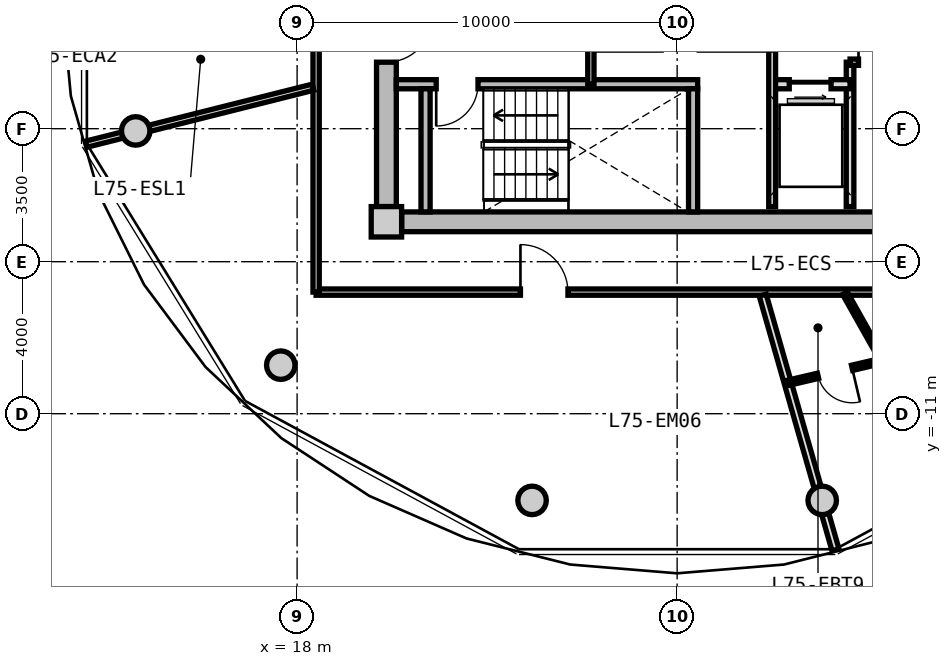
"""IFC4 building model, lengths in metres.
Left out: names, types, materials, properties, quantities, classifications, styles, units other than length and angle.
Written with IfcOpenShell. Run it as: python <this file> out.ifc"""

import sys

from ifc_helpers import new_model, si_unit, direction, frame, frame_2d, origin, origin_2d, place, context, subcontext, project, spatial, rectangle, circle, extrude, source, transform, mapped, element, fill, save


model = new_model("IFC4")
c1 = context("Model", 3, precision=1e-05, world=origin(), true_north=direction((0.0, 1.0)))
c2 = subcontext(c1, "Body", "Model", "MODEL_VIEW")
j1 = project(units=[si_unit("LENGTHUNIT", "METRE"), si_unit("PLANEANGLEUNIT", "RADIAN")], contexts=[c1])
p1 = place(None, origin())
s1 = spatial("IfcSite", under=j1, at=p1, CompositionType="ELEMENT")
p2 = place(p1, origin())
s2 = spatial("IfcBuilding", under=s1, at=p2, CompositionType="ELEMENT")
p3 = place(p2, frame((0.0, 0.0, 241.35)))
s3 = spatial("IfcBuildingStorey", under=s2, at=p3, CompositionType="ELEMENT", Elevation=241.35)
m1 = source(origin(), c2, "Body", "SweptSolid", [
    extrude(rectangle(XDim=0.8, YDim=0.8, at=origin_2d()), origin(), (0.0, 0.0, 1.0), 3.05),
])
p4 = place(p3, frame((20.35, -5.95, 0.0), z_axis=(0.0, 0.0, 1.0), x_axis=(1.0, 0.0, 0.0)))
e1 = element("IfcColumn", 1, at=p4, inside=s3, PredefinedType="COLUMN", context=c2, shape_type="MappedRepresentation", body=[
    mapped(m1, transform((0.0, 0.0, 0.0), x_axis=(1.0, 0.0, 0.0), y_axis=(0.0, 1.0, 0.0), z_axis=(0.0, 0.0, 1.0), scale=1.0)),
])
m2 = source(origin(), c2, "Body", "SweptSolid", [
    extrude(rectangle(XDim=14.5, YDim=0.52, at=frame_2d((7.25, 0.0))), origin(), (0.0, 0.0, 1.0), 2.73),
])
p5 = place(p3, frame((35.25, -5.95, 0.0), z_axis=(0.0, 0.0, 1.0), x_axis=(-1.0, 0.0, 0.0)))
e2 = element("IfcWall", 2, at=p5, inside=s3, PredefinedType="SHEAR", context=c2, shape_type="MappedRepresentation", body=[
    mapped(m2, transform((0.0, 0.0, 0.0), x_axis=(1.0, 0.0, 0.0), y_axis=(0.0, 1.0, 0.0), z_axis=(0.0, 0.0, 1.0), scale=1.0)),
])
m3 = source(origin(), c2, "Body", "SweptSolid", [
    extrude(rectangle(XDim=11.1, YDim=0.52, at=frame_2d((5.55, 0.0))), origin(), (0.0, 0.0, 1.0), 2.73),
])
p6 = place(p3, frame((20.35, -5.55, 0.0), z_axis=(0.0, 0.0, 1.0), x_axis=(0.0, 1.0, 0.0)))
e3 = element("IfcWall", 3, at=p6, inside=s3, PredefinedType="SHEAR", context=c2, shape_type="MappedRepresentation", body=[
    mapped(m3, transform((0.0, 0.0, 0.0), x_axis=(1.0, 0.0, 0.0), y_axis=(0.0, 1.0, 0.0), z_axis=(0.0, 0.0, 1.0), scale=1.0)),
])
p7 = place(p6, frame((3.8, 0.0, 0.0)))
e4 = element("IfcOpeningElement", 4, at=p7, cuts=e3, PredefinedType="OPENING", context=c2, shape_type="SweptSolid", body=[
    extrude(rectangle(XDim=1.2, YDim=2.15, at=frame_2d((0.6, 1.075))), frame((0.0, 0.27, 0.0), z_axis=(0.0, -1.0, 0.0), x_axis=(1.0, 0.0, 0.0)), (0.0, 0.0, 1.0), 0.54),
])
m4 = source(origin(), c2, "Body", "SweptSolid", [
    extrude(circle(Radius=0.375, at=origin_2d()), origin(), (0.0, 0.0, 1.0), 3.05),
])
for number, where, z_axis, x_axis in (
    (5, (13.753, -3.559, 0.0), (0.0, 0.0, 1.0), (1.0, 0.0, 0.0)),
    (6, (17.57, -9.723, 0.0), (0.0, 0.0, 1.0), (1.0, 0.0, 0.0)),
    (7, (24.182, -13.281, 0.0), (0.0, 0.0, 1.0), (1.0, 0.0, 0.0)),
    (8, (31.818, -13.281, 0.0), (0.0, 0.0, 1.0), (1.0, 0.0, 0.0)),
):
    element("IfcColumn", number, at=place(p3, frame(where, z_axis=z_axis, x_axis=x_axis)), inside=s3, PredefinedType="COLUMN", context=c2, shape_type="MappedRepresentation", body=[
        mapped(m4, transform((0.0, 0.0, 0.0), x_axis=(1.0, 0.0, 0.0), y_axis=(0.0, 1.0, 0.0), z_axis=(0.0, 0.0, 1.0), scale=1.0)),
    ])
m5 = source(origin(), c2, "Body", "SweptSolid", [
    extrude(rectangle(XDim=7.93, YDim=0.24, at=frame_2d((3.965, 0.0))), origin(), (0.0, 0.0, 1.0), 2.73),
])
p8 = place(p3, frame((20.61, -2.33, 0.0), z_axis=(0.0, 0.0, 1.0), x_axis=(1.0, 0.0, 0.0)))
e9 = element("IfcWall", 9, at=p8, inside=s3, PredefinedType="PARTITIONING", context=c2, shape_type="MappedRepresentation", body=[
    mapped(m5, transform((0.0, 0.0, 0.0), x_axis=(1.0, 0.0, 0.0), y_axis=(0.0, 1.0, 0.0), z_axis=(0.0, 0.0, 1.0), scale=1.0)),
])
p9 = place(p8, frame((1.05, 0.0, 0.0)))
e10 = element("IfcOpeningElement", 10, at=p9, cuts=e9, PredefinedType="OPENING", context=c2, shape_type="SweptSolid", body=[
    extrude(rectangle(XDim=1.1, YDim=2.15, at=frame_2d((0.55, 1.075))), frame((0.0, 0.13, 0.0), z_axis=(0.0, -1.0, 0.0), x_axis=(1.0, 0.0, 0.0)), (0.0, 0.0, 1.0), 0.26),
])
m6 = source(origin(), c2, "Body", "SweptSolid", [
    extrude(rectangle(XDim=3.24, YDim=0.24, at=frame_2d((1.62, 0.0))), origin(), (0.0, 0.0, 1.0), 2.73),
])
for number, where, z_axis, x_axis in (
    (11, (21.38, -5.69, 0.0), (0.0, 0.0, 1.0), (0.0, 1.0, 0.0)),
    (12, (28.42, -5.69, 0.0), (0.0, 0.0, 1.0), (0.0, 1.0, 0.0)),
):
    element("IfcWall", number, at=place(p3, frame(where, z_axis=z_axis, x_axis=x_axis)), inside=s3, PredefinedType="PARTITIONING", context=c2, shape_type="MappedRepresentation", body=[
        mapped(m6, transform((0.0, 0.0, 0.0), x_axis=(1.0, 0.0, 0.0), y_axis=(0.0, 1.0, 0.0), z_axis=(0.0, 0.0, 1.0), scale=1.0)),
    ])
m7 = source(origin(), c2, "Body", "SweptSolid", [
    extrude(rectangle(XDim=3.8, YDim=0.2, at=frame_2d((1.9, 0.0))), origin(), (0.0, 0.0, 1.0), 2.715),
])
p10 = place(p3, frame((32.55, -5.55, 0.0), z_axis=(0.0, 0.0, 1.0), x_axis=(0.0, 1.0, 0.0)))
e13 = element("IfcWall", 13, at=p10, inside=s3, PredefinedType="PARTITIONING", context=c2, shape_type="MappedRepresentation", body=[
    mapped(m7, transform((0.0, 0.0, 0.0), x_axis=(1.0, 0.0, 0.0), y_axis=(0.0, 1.0, 0.0), z_axis=(0.0, 0.0, 1.0), scale=1.0)),
])
m8 = source(origin(), c2, "Body", "SweptSolid", [
    extrude(rectangle(XDim=2.05, YDim=0.24, at=frame_2d((1.025, 0.0))), origin(), (0.0, 0.0, 1.0), 2.715),
])
p11 = place(p3, frame((30.5, -2.33, 0.0), z_axis=(0.0, 0.0, 1.0), x_axis=(1.0, 0.0, 0.0)))
e14 = element("IfcWall", 14, at=p11, inside=s3, PredefinedType="PARTITIONING", context=c2, shape_type="MappedRepresentation", body=[
    mapped(m8, transform((0.0, 0.0, 0.0), x_axis=(1.0, 0.0, 0.0), y_axis=(0.0, 1.0, 0.0), z_axis=(0.0, 0.0, 1.0), scale=1.0)),
])
p12 = place(p11, frame((0.45, 0.0, 0.0)))
e15 = element("IfcOpeningElement", 15, at=p12, cuts=e14, PredefinedType="OPENING", context=c2, shape_type="SweptSolid", body=[
    extrude(rectangle(XDim=1.1, YDim=2.2, at=frame_2d((0.55, 1.1))), frame((0.0, 0.13, 0.0), z_axis=(0.0, -1.0, 0.0), x_axis=(1.0, 0.0, 0.0)), (0.0, 0.0, 1.0), 0.26),
])
m9 = source(origin(), c2, "Body", "SweptSolid", [
    extrude(rectangle(XDim=4.2, YDim=0.18, at=frame_2d((2.1, 0.0))), origin(), (0.0, 0.0, 1.0), 2.715),
])
p13 = place(p3, frame((30.5, -5.55, 0.0), z_axis=(0.0, 0.0, 1.0), x_axis=(0.0, 1.0, 0.0)))
e16 = element("IfcWall", 16, at=p13, inside=s3, PredefinedType="PARTITIONING", context=c2, shape_type="MappedRepresentation", body=[
    mapped(m9, transform((0.0, 0.0, 0.0), x_axis=(1.0, 0.0, 0.0), y_axis=(0.0, 1.0, 0.0), z_axis=(0.0, 0.0, 1.0), scale=1.0)),
])
m10 = source(origin(), c2, "Body", "SweptSolid", [
    extrude(rectangle(XDim=0.98, YDim=0.165, at=frame_2d((0.49, 0.0))), origin(), (0.0, 0.0, 1.0), 2.715),
])
p14 = place(p3, frame((25.73, -2.33, 0.0), z_axis=(0.0, 0.0, 1.0), x_axis=(0.0, 1.0, 0.0)))
e17 = element("IfcWall", 17, at=p14, inside=s3, PredefinedType="PARTITIONING", context=c2, shape_type="MappedRepresentation", body=[
    mapped(m10, transform((0.0, 0.0, 0.0), x_axis=(1.0, 0.0, 0.0), y_axis=(0.0, 1.0, 0.0), z_axis=(0.0, 0.0, 1.0), scale=1.0)),
])
m11 = source(origin(), c2, "Body", "SweptSolid", [
    extrude(rectangle(XDim=2.7, YDim=0.165, at=frame_2d((1.35, 0.0))), origin(), (0.0, 0.0, 1.0), 2.715),
])
p15 = place(p3, frame((32.55, -1.75, 0.0), z_axis=(0.0, 0.0, 1.0), x_axis=(1.0, 0.0, 0.0)))
e18 = element("IfcWall", 18, at=p15, inside=s3, PredefinedType="PARTITIONING", context=c2, shape_type="MappedRepresentation", body=[
    mapped(m11, transform((0.0, 0.0, 0.0), x_axis=(1.0, 0.0, 0.0), y_axis=(0.0, 1.0, 0.0), z_axis=(0.0, 0.0, 1.0), scale=1.0)),
])
p16 = place(p15, frame((0.222, 0.0, 0.0)))
e19 = element("IfcOpeningElement", 19, at=p16, cuts=e18, PredefinedType="OPENING", context=c2, shape_type="SweptSolid", body=[
    extrude(rectangle(XDim=0.925, YDim=2.1, at=frame_2d((0.462, 1.05))), frame((0.0, 0.093, 0.0), z_axis=(0.0, -1.0, 0.0), x_axis=(1.0, 0.0, 0.0)), (0.0, 0.0, 1.0), 0.185),
])
p17 = place(p15, frame((1.522, 0.0, 0.0)))
e20 = element("IfcOpeningElement", 20, at=p17, cuts=e18, PredefinedType="OPENING", context=c2, shape_type="SweptSolid", body=[
    extrude(rectangle(XDim=0.925, YDim=2.1, at=frame_2d((0.462, 1.05))), frame((0.0, 0.093, 0.0), z_axis=(0.0, -1.0, 0.0), x_axis=(1.0, 0.0, 0.0)), (0.0, 0.0, 1.0), 0.185),
])
m12 = source(origin(), c2, "Body", "SweptSolid", [
    extrude(rectangle(XDim=19.0, YDim=0.165, at=frame_2d((9.5, 0.0))), origin(), (0.0, 0.0, 1.0), 2.715),
])
p18 = place(p3, frame((37.5, -7.8, 0.0), z_axis=(0.0, 0.0, 1.0), x_axis=(-1.0, 0.0, 0.0)))
e21 = element("IfcWall", 21, at=p18, inside=s3, PredefinedType="PARTITIONING", context=c2, shape_type="MappedRepresentation", body=[
    mapped(m12, transform((0.0, 0.0, 0.0), x_axis=(1.0, 0.0, 0.0), y_axis=(0.0, 1.0, 0.0), z_axis=(0.0, 0.0, 1.0), scale=1.0)),
])
p19 = place(p18, frame((12.373, 0.0, 0.0)))
e22 = element("IfcOpeningElement", 22, at=p19, cuts=e21, PredefinedType="OPENING", context=c2, shape_type="SweptSolid", body=[
    extrude(rectangle(XDim=1.25, YDim=2.2, at=frame_2d((0.625, 1.1))), frame((0.0, 0.093, 0.0), z_axis=(0.0, -1.0, 0.0), x_axis=(1.0, 0.0, 0.0)), (0.0, 0.0, 1.0), 0.185),
])
m13 = source(origin(), c2, "Body", "SweptSolid", [
    extrude(rectangle(XDim=6.88, YDim=0.165, at=frame_2d((3.44, 0.0))), origin(), (0.0, 0.0, 1.0), 2.715),
])
p20 = place(p3, frame((18.5, -7.8, 0.0), z_axis=(0.0, 0.0, 1.0), x_axis=(0.0, 1.0, 0.0)))
e23 = element("IfcWall", 23, at=p20, inside=s3, PredefinedType="PARTITIONING", context=c2, shape_type="MappedRepresentation", body=[
    mapped(m13, transform((0.0, 0.0, 0.0), x_axis=(1.0, 0.0, 0.0), y_axis=(0.0, 1.0, 0.0), z_axis=(0.0, 0.0, 1.0), scale=1.0)),
])
m14 = source(origin(), c2, "Body", "SweptSolid", [
    extrude(rectangle(XDim=6.157, YDim=0.165, at=frame_2d((3.079, 0.0))), origin(), (0.0, 0.0, 1.0), 2.315),
])
p21 = place(p3, frame((18.42, -2.407, 0.0), z_axis=(0.0, 0.0, 1.0), x_axis=(-0.969840867184, -0.243738984038, 0.0)))
e24 = element("IfcWall", 24, at=p21, inside=s3, PredefinedType="PARTITIONING", context=c2, shape_type="MappedRepresentation", body=[
    mapped(m14, transform((0.0, 0.0, 0.0), x_axis=(1.0, 0.0, 0.0), y_axis=(0.0, 1.0, 0.0), z_axis=(0.0, 0.0, 1.0), scale=1.0)),
])
m15 = source(origin(), c2, "Body", "SweptSolid", [
    extrude(rectangle(XDim=6.974, YDim=0.19, at=frame_2d((3.487, 0.0))), origin(), (0.0, 0.0, 1.0), 2.315),
])
p22 = place(p3, frame((30.251, -7.88, 0.0), z_axis=(0.0, 0.0, 1.0), x_axis=(0.274707256801, -0.961527910703, 0.0)))
e25 = element("IfcWall", 25, at=p22, inside=s3, PredefinedType="PARTITIONING", context=c2, shape_type="MappedRepresentation", body=[
    mapped(m15, transform((0.0, 0.0, 0.0), x_axis=(1.0, 0.0, 0.0), y_axis=(0.0, 1.0, 0.0), z_axis=(0.0, 0.0, 1.0), scale=1.0)),
])
m16 = source(origin(), c2, "Body", "SweptSolid", [
    extrude(rectangle(XDim=2.035, YDim=0.14, at=frame_2d((1.018, 0.0))), origin(), (0.0, 0.0, 1.0), 2.715),
])
p23 = place(p3, frame((32.415, -7.83, 0.0), z_axis=(0.0, 0.0, 1.0), x_axis=(0.491092509169, -0.871107425888, 0.0)))
e26 = element("IfcWall", 26, at=p23, inside=s3, PredefinedType="PARTITIONING", context=c2, shape_type="MappedRepresentation", body=[
    mapped(m16, transform((0.0, 0.0, 0.0), x_axis=(1.0, 0.0, 0.0), y_axis=(0.0, 1.0, 0.0), z_axis=(0.0, 0.0, 1.0), scale=1.0)),
])
m17 = source(origin(), c2, "Body", "SweptSolid", [
    extrude(rectangle(XDim=2.586, YDim=0.14, at=frame_2d((1.293, 0.0))), origin(), (0.0, 0.0, 1.0), 2.715),
])
p24 = place(p3, frame((33.415, -9.603, 0.0), z_axis=(0.0, 0.0, 1.0), x_axis=(-0.973691298219, -0.227871138526, 0.0)))
e27 = element("IfcWall", 27, at=p24, inside=s3, PredefinedType="PARTITIONING", context=c2, shape_type="MappedRepresentation", body=[
    mapped(m17, transform((0.0, 0.0, 0.0), x_axis=(1.0, 0.0, 0.0), y_axis=(0.0, 1.0, 0.0), z_axis=(0.0, 0.0, 1.0), scale=1.0)),
])
p25 = place(p24, frame((0.833, 0.0, 0.0)))
e28 = element("IfcOpeningElement", 28, at=p25, cuts=e27, PredefinedType="OPENING", context=c2, shape_type="SweptSolid", body=[
    extrude(rectangle(XDim=0.92, YDim=2.1, at=frame_2d((0.46, 1.05))), frame((0.0, 0.08, 0.0), z_axis=(0.0, -1.0, 0.0), x_axis=(1.0, 0.0, 0.0)), (0.0, 0.0, 1.0), 0.16),
])
m18 = source(origin(), c2, "Body", "SweptSolid", [
    extrude(rectangle(XDim=1.1, YDim=2.15, at=frame_2d((0.55, 1.075))), frame((0.0, 0.025, 0.0), z_axis=(0.0, -1.0, 0.0), x_axis=(1.0, 0.0, 0.0)), (0.0, 0.0, 1.0), 0.05),
])
p26 = place(p9, frame((1.1, 0.0, 0.0), z_axis=(0.0, 0.0, 1.0), x_axis=(-1.0, 0.0, 0.0)))
e29 = element("IfcDoor", 29, at=p26, inside=s3, OperationType="SINGLE_SWING_RIGHT", PredefinedType="DOOR", context=c2, shape_type="MappedRepresentation", body=[
    mapped(m18, transform((0.0, 0.0, 0.0), x_axis=(1.0, 0.0, 0.0), y_axis=(0.0, 1.0, 0.0), z_axis=(0.0, 0.0, 1.0), scale=1.0)),
])
fill(e10, e29)
m19 = source(origin(), c2, "Body", "SweptSolid", [
    extrude(rectangle(XDim=1.2, YDim=2.15, at=frame_2d((0.6, 1.075))), frame((0.0, 0.025, 0.0), z_axis=(0.0, -1.0, 0.0), x_axis=(1.0, 0.0, 0.0)), (0.0, 0.0, 1.0), 0.05),
])
p27 = place(p7, frame((1.2, 0.0, 0.0), z_axis=(0.0, 0.0, 1.0), x_axis=(-1.0, 0.0, 0.0)))
e30 = element("IfcDoor", 30, at=p27, inside=s3, OperationType="SINGLE_SWING_LEFT", PredefinedType="DOOR", context=c2, shape_type="MappedRepresentation", body=[
    mapped(m19, transform((0.0, 0.0, 0.0), x_axis=(1.0, 0.0, 0.0), y_axis=(0.0, 1.0, 0.0), z_axis=(0.0, 0.0, 1.0), scale=1.0)),
])
fill(e4, e30)
m20 = source(origin(), c2, "Body", "SweptSolid", [
    extrude(rectangle(XDim=1.1, YDim=2.2, at=frame_2d((0.55, 1.1))), frame((0.0, 0.025, 0.0), z_axis=(0.0, -1.0, 0.0), x_axis=(1.0, 0.0, 0.0)), (0.0, 0.0, 1.0), 0.05),
])
p28 = place(p12, frame((1.1, 0.0, 0.0), z_axis=(0.0, 0.0, 1.0), x_axis=(-1.0, 0.0, 0.0)))
e31 = element("IfcDoor", 31, at=p28, inside=s3, OperationType="SLIDING_TO_RIGHT", PredefinedType="DOOR", context=c2, shape_type="MappedRepresentation", body=[
    mapped(m20, transform((0.0, 0.0, 0.0), x_axis=(1.0, 0.0, 0.0), y_axis=(0.0, 1.0, 0.0), z_axis=(0.0, 0.0, 1.0), scale=1.0)),
])
fill(e15, e31)
m21 = source(origin(), c2, "Body", "SweptSolid", [
    extrude(rectangle(XDim=0.925, YDim=2.1, at=frame_2d((0.462, 1.05))), frame((0.0, 0.025, 0.0), z_axis=(0.0, -1.0, 0.0), x_axis=(1.0, 0.0, 0.0)), (0.0, 0.0, 1.0), 0.05),
])
p29 = place(p16, origin())
e32 = element("IfcDoor", 32, at=p29, inside=s3, OperationType="SINGLE_SWING_LEFT", PredefinedType="DOOR", context=c2, shape_type="MappedRepresentation", body=[
    mapped(m21, transform((0.0, 0.0, 0.0), x_axis=(1.0, 0.0, 0.0), y_axis=(0.0, 1.0, 0.0), z_axis=(0.0, 0.0, 1.0), scale=1.0)),
])
fill(e19, e32)
m22 = source(origin(), c2, "Body", "SweptSolid", [
    extrude(rectangle(XDim=1.25, YDim=2.2, at=frame_2d((0.625, 1.1))), frame((0.0, 0.025, 0.0), z_axis=(0.0, -1.0, 0.0), x_axis=(1.0, 0.0, 0.0)), (0.0, 0.0, 1.0), 0.05),
])
p30 = place(p19, frame((1.25, 0.0, 0.0), z_axis=(0.0, 0.0, 1.0), x_axis=(-1.0, 0.0, 0.0)))
e33 = element("IfcDoor", 33, at=p30, inside=s3, OperationType="SINGLE_SWING_LEFT", PredefinedType="DOOR", context=c2, shape_type="MappedRepresentation", body=[
    mapped(m22, transform((0.0, 0.0, 0.0), x_axis=(1.0, 0.0, 0.0), y_axis=(0.0, 1.0, 0.0), z_axis=(0.0, 0.0, 1.0), scale=1.0)),
])
fill(e22, e33)
m23 = source(origin(), c2, "Body", "SweptSolid", [
    extrude(rectangle(XDim=0.92, YDim=2.1, at=frame_2d((0.46, 1.05))), frame((0.0, 0.025, 0.0), z_axis=(0.0, -1.0, 0.0), x_axis=(1.0, 0.0, 0.0)), (0.0, 0.0, 1.0), 0.05),
])
p31 = place(p25, origin())
e34 = element("IfcDoor", 34, at=p31, inside=s3, OperationType="SINGLE_SWING_LEFT", PredefinedType="DOOR", context=c2, shape_type="MappedRepresentation", body=[
    mapped(m23, transform((0.0, 0.0, 0.0), x_axis=(1.0, 0.0, 0.0), y_axis=(0.0, 1.0, 0.0), z_axis=(0.0, 0.0, 1.0), scale=1.0)),
])
fill(e28, e34)
save(model, sys.argv[1])
